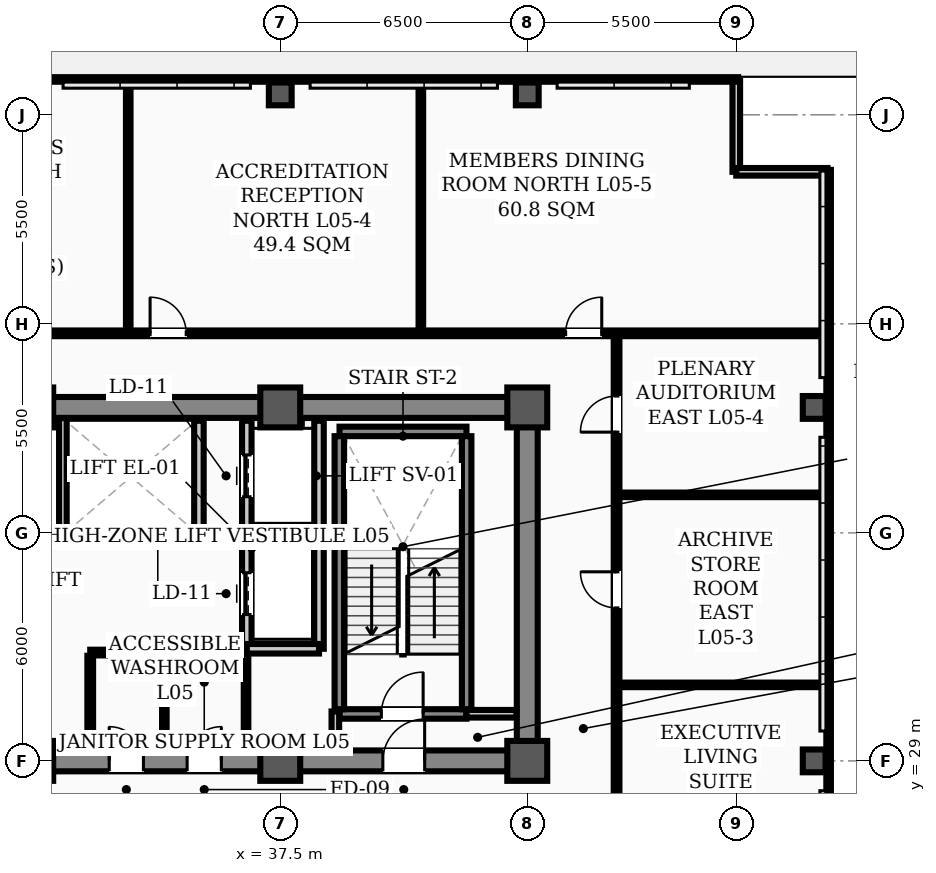
"""IFC4 building model, lengths in metres.
Left out: names, types, materials, properties, quantities, classifications, styles, units other than length and angle.
Written with IfcOpenShell. Run it as: python <this file> out.ifc"""

import sys

from ifc_helpers import new_model, si_unit, direction, frame, frame_2d, origin, origin_2d, place, context, subcontext, project, spatial, rectangle, hollow_rectangle, extrude, element, fill, save


model = new_model("IFC4")
c1 = context("Model", 3, precision=1e-05, world=origin(), true_north=direction((0.0, 1.0)))
c2 = subcontext(c1, "Body", "Model", "MODEL_VIEW")
j1 = project(units=[si_unit("LENGTHUNIT", "METRE"), si_unit("PLANEANGLEUNIT", "RADIAN")], contexts=[c1])
p1 = place(None, origin())
s1 = spatial("IfcSite", under=j1, at=p1, CompositionType="ELEMENT")
p2 = place(p1, origin())
s2 = spatial("IfcBuilding", under=s1, at=p2, CompositionType="ELEMENT")
p3 = place(p2, frame((0.0, 0.0, 22.0)))
s3 = spatial("IfcBuildingStorey", under=s2, at=p3, CompositionType="ELEMENT", Elevation=22.0)
for number, where, z_axis, x_axis in (
    (1, (31.0, 29.0, 0.0), (0.0, 0.0, 1.0), (1.0, 0.0, 0.0)),
    (2, (31.0, 38.3, 0.0), (0.0, 0.0, 1.0), (1.0, 0.0, 0.0)),
    (3, (37.5, 29.0, 0.0), (0.0, 0.0, 1.0), (1.0, 0.0, 0.0)),
    (4, (37.5, 38.3, 0.0), (0.0, 0.0, 1.0), (1.0, 0.0, 0.0)),
    (5, (44.0, 29.0, 0.0), (0.0, 0.0, 1.0), (1.0, 0.0, 0.0)),
    (6, (44.0, 38.3, 0.0), (0.0, 0.0, 1.0), (1.0, 0.0, 0.0)),
):
    element("IfcColumn", number, at=place(p3, frame(where, z_axis=z_axis, x_axis=x_axis)), inside=s3, PredefinedType="COLUMN", context=c2, shape_type="SweptSolid", body=[
        extrude(hollow_rectangle(XDim=1.05, YDim=1.05, WallThickness=0.038, InnerFilletRadius=0.019, OuterFilletRadius=0.057, at=origin_2d()), origin(), (0.0, 0.0, 1.0), 4.5),
    ])
for number, where, z_axis, x_axis in (
    (7, (37.5, 46.55, 0.0), (0.0, 0.0, 1.0), (1.0, 0.0, 0.0)),
    (8, (44.0, 46.55, 0.0), (0.0, 0.0, 1.0), (1.0, 0.0, 0.0)),
    (9, (51.55, 29.0, 0.0), (0.0, 0.0, 1.0), (1.0, 0.0, 0.0)),
    (10, (51.55, 38.3, 0.0), (0.0, 0.0, 1.0), (1.0, 0.0, 0.0)),
):
    element("IfcColumn", number, at=place(p3, frame(where, z_axis=z_axis, x_axis=x_axis)), inside=s3, PredefinedType="COLUMN", context=c2, shape_type="SweptSolid", body=[
        extrude(hollow_rectangle(XDim=0.6, YDim=0.6, WallThickness=0.026, InnerFilletRadius=0.013, OuterFilletRadius=0.039, at=origin_2d()), origin(), (0.0, 0.0, 1.0), 4.5),
    ])
for number, where, z_axis, x_axis in (
    (11, (49.5, 46.9, 0.0), (0.0, 0.0, 1.0), (0.0, -1.0, 0.0)),
    (12, (49.5, 44.5, 0.0), (0.0, 0.0, 1.0), (1.0, 0.0, 0.0)),
):
    element("IfcWall", number, at=place(p3, frame(where, z_axis=z_axis, x_axis=x_axis)), inside=s3, PredefinedType="PARAPET", context=c2, shape_type="SweptSolid", body=[
        extrude(rectangle(XDim=2.4, YDim=0.2, at=frame_2d((1.2, 0.0))), origin(), (0.0, 0.0, 1.0), 1.2),
    ])
p4 = place(p3, frame((4.45, 46.93, 0.0), z_axis=(0.0, 0.0, 1.0), x_axis=(1.0, 0.0, 0.0)))
e13 = element("IfcWall", 13, at=p4, inside=s3, PredefinedType="PARAPET", context=c2, shape_type="SweptSolid", body=[
    extrude(rectangle(XDim=45.1, YDim=0.12, at=frame_2d((22.55, 0.0))), origin(), (0.0, 0.0, 1.0), 1.2),
])
p5 = place(p3, frame((51.93, 17.45, 0.0), z_axis=(0.0, 0.0, 1.0), x_axis=(0.0, 1.0, 0.0)))
e14 = element("IfcWall", 14, at=p5, inside=s3, PredefinedType="PARAPET", context=c2, shape_type="SweptSolid", body=[
    extrude(rectangle(XDim=27.1, YDim=0.12, at=frame_2d((13.55, 0.0))), origin(), (0.0, 0.0, 1.0), 1.2),
])
p6 = place(p3, frame((13.5, 29.0, 0.0), z_axis=(0.0, 0.0, 1.0), x_axis=(1.0, 0.0, 0.0)))
e15 = element("IfcWall", 15, at=p6, inside=s3, PredefinedType="SHEAR", context=c2, shape_type="SweptSolid", body=[
    extrude(rectangle(XDim=30.5, YDim=0.55, at=frame_2d((15.25, 0.0))), origin(), (0.0, 0.0, 1.0), 4.32),
])
p7 = place(p6, frame((1.75, 0.0, 0.0)))
e16 = element("IfcOpeningElement", 16, at=p7, cuts=e15, PredefinedType="OPENING", context=c2, shape_type="SweptSolid", body=[
    extrude(rectangle(XDim=1.1, YDim=2.08, at=frame_2d((0.55, 1.04))), frame((0.0, 0.285, 0.0), z_axis=(0.0, -1.0, 0.0), x_axis=(1.0, 0.0, 0.0)), (0.0, 0.0, 1.0), 0.57),
])
p8 = place(p6, frame((26.7, 0.0, 0.0)))
e17 = element("IfcOpeningElement", 17, at=p8, cuts=e15, PredefinedType="OPENING", context=c2, shape_type="SweptSolid", body=[
    extrude(rectangle(XDim=1.1, YDim=2.08, at=frame_2d((0.55, 1.04))), frame((0.0, 0.285, 0.0), z_axis=(0.0, -1.0, 0.0), x_axis=(1.0, 0.0, 0.0)), (0.0, 0.0, 1.0), 0.57),
])
p9 = place(p6, frame((6.8, 0.0, 0.0)))
e18 = element("IfcOpeningElement", 18, at=p9, cuts=e15, PredefinedType="OPENING", context=c2, shape_type="SweptSolid", body=[
    extrude(rectangle(XDim=1.1, YDim=2.08, at=frame_2d((0.55, 1.04))), frame((0.0, 0.285, 0.0), z_axis=(0.0, -1.0, 0.0), x_axis=(1.0, 0.0, 0.0)), (0.0, 0.0, 1.0), 0.57),
])
p10 = place(p6, frame((13.2, 0.0, 0.0)))
e19 = element("IfcOpeningElement", 19, at=p10, cuts=e15, PredefinedType="OPENING", context=c2, shape_type="SweptSolid", body=[
    extrude(rectangle(XDim=1.6, YDim=2.08, at=frame_2d((0.8, 1.04))), frame((0.0, 0.285, 0.0), z_axis=(0.0, -1.0, 0.0), x_axis=(1.0, 0.0, 0.0)), (0.0, 0.0, 1.0), 0.57),
])
p11 = place(p6, frame((19.5, 0.0, 0.0)))
e20 = element("IfcOpeningElement", 20, at=p11, cuts=e15, PredefinedType="OPENING", context=c2, shape_type="SweptSolid", body=[
    extrude(rectangle(XDim=0.9, YDim=2.08, at=frame_2d((0.45, 1.04))), frame((0.0, 0.285, 0.0), z_axis=(0.0, -1.0, 0.0), x_axis=(1.0, 0.0, 0.0)), (0.0, 0.0, 1.0), 0.57),
])
p12 = place(p6, frame((21.55, 0.0, 0.0)))
e21 = element("IfcOpeningElement", 21, at=p12, cuts=e15, PredefinedType="OPENING", context=c2, shape_type="SweptSolid", body=[
    extrude(rectangle(XDim=0.9, YDim=2.08, at=frame_2d((0.45, 1.04))), frame((0.0, 0.285, 0.0), z_axis=(0.0, -1.0, 0.0), x_axis=(1.0, 0.0, 0.0)), (0.0, 0.0, 1.0), 0.57),
])
p13 = place(p3, frame((13.5, 38.3, 0.0), z_axis=(0.0, 0.0, 1.0), x_axis=(1.0, 0.0, 0.0)))
e22 = element("IfcWall", 22, at=p13, inside=s3, PredefinedType="SHEAR", context=c2, shape_type="SweptSolid", body=[
    extrude(rectangle(XDim=30.5, YDim=0.55, at=frame_2d((15.25, 0.0))), origin(), (0.0, 0.0, 1.0), 4.32),
])
p14 = place(p3, frame((44.0, 29.35, 0.0), z_axis=(0.0, 0.0, 1.0), x_axis=(0.0, 1.0, 0.0)))
e23 = element("IfcWall", 23, at=p14, inside=s3, PredefinedType="SHEAR", context=c2, shape_type="SweptSolid", body=[
    extrude(rectangle(XDim=8.6, YDim=0.55, at=frame_2d((4.3, 0.0))), origin(), (0.0, 0.0, 1.0), 4.32),
])
p15 = place(p3, frame((39.06, 30.235, 0.0), z_axis=(0.0, 0.0, 1.0), x_axis=(1.0, 0.0, 0.0)))
e24 = element("IfcWall", 24, at=p15, inside=s3, PredefinedType="STANDARD", context=c2, shape_type="SweptSolid", body=[
    extrude(rectangle(XDim=3.34, YDim=0.25, at=frame_2d((1.67, 0.0))), origin(), (0.0, 0.0, 1.0), 4.32),
])
p16 = place(p15, frame((1.1, 0.0, 0.0)))
e25 = element("IfcOpeningElement", 25, at=p16, cuts=e24, PredefinedType="OPENING", context=c2, shape_type="SweptSolid", body=[
    extrude(rectangle(XDim=1.1, YDim=2.08, at=frame_2d((0.55, 1.04))), frame((0.0, 0.135, 0.0), z_axis=(0.0, -1.0, 0.0), x_axis=(1.0, 0.0, 0.0)), (0.0, 0.0, 1.0), 0.27),
])
p17 = place(p3, frame((39.06, 37.669, 0.0), z_axis=(0.0, 0.0, 1.0), x_axis=(1.0, 0.0, 0.0)))
e26 = element("IfcWall", 26, at=p17, inside=s3, PredefinedType="STANDARD", context=c2, shape_type="SweptSolid", body=[
    extrude(rectangle(XDim=3.34, YDim=0.25, at=frame_2d((1.67, 0.0))), origin(), (0.0, 0.0, 1.0), 4.32),
])
for number, where, z_axis, x_axis in (
    (27, (39.055, 30.36, 0.0), (0.0, 0.0, 1.0), (0.0, 1.0, 0.0)),
    (28, (42.405, 30.36, 0.0), (0.0, 0.0, 1.0), (0.0, 1.0, 0.0)),
):
    element("IfcWall", number, at=place(p3, frame(where, z_axis=z_axis, x_axis=x_axis)), inside=s3, PredefinedType="STANDARD", context=c2, shape_type="SweptSolid", body=[
        extrude(rectangle(XDim=7.184, YDim=0.25, at=frame_2d((3.592, 0.0))), origin(), (0.0, 0.0, 1.0), 4.32),
    ])
p18 = place(p3, frame((36.62, 31.95, 0.0), z_axis=(0.0, 0.0, 1.0), x_axis=(0.0, 1.0, 0.0)))
e29 = element("IfcWall", 29, at=p18, inside=s3, PredefinedType="STANDARD", context=c2, shape_type="SweptSolid", body=[
    extrude(rectangle(XDim=6.0, YDim=0.25, at=frame_2d((3.0, 0.0))), origin(), (0.0, 0.0, 1.0), 3.9),
])
p19 = place(p18, frame((0.9, 0.0, 0.0)))
e30 = element("IfcOpeningElement", 30, at=p19, cuts=e29, PredefinedType="OPENING", context=c2, shape_type="SweptSolid", body=[
    extrude(rectangle(XDim=1.1, YDim=2.08, at=frame_2d((0.55, 1.04))), frame((0.0, 0.135, 0.0), z_axis=(0.0, -1.0, 0.0), x_axis=(1.0, 0.0, 0.0)), (0.0, 0.0, 1.0), 0.27),
])
p20 = place(p18, frame((4.0, 0.0, 0.0)))
e31 = element("IfcOpeningElement", 31, at=p20, cuts=e29, PredefinedType="OPENING", context=c2, shape_type="SweptSolid", body=[
    extrude(rectangle(XDim=1.1, YDim=2.08, at=frame_2d((0.55, 1.04))), frame((0.0, 0.135, 0.0), z_axis=(0.0, -1.0, 0.0), x_axis=(1.0, 0.0, 0.0)), (0.0, 0.0, 1.0), 0.27),
])
p21 = place(p3, frame((38.52, 31.95, 0.0), z_axis=(0.0, 0.0, 1.0), x_axis=(0.0, 1.0, 0.0)))
e32 = element("IfcWall", 32, at=p21, inside=s3, PredefinedType="STANDARD", context=c2, shape_type="SweptSolid", body=[
    extrude(rectangle(XDim=6.0, YDim=0.25, at=frame_2d((3.0, 0.0))), origin(), (0.0, 0.0, 1.0), 3.9),
])
p22 = place(p3, frame((36.62, 31.95, 0.0), z_axis=(0.0, 0.0, 1.0), x_axis=(1.0, 0.0, 0.0)))
e33 = element("IfcWall", 33, at=p22, inside=s3, PredefinedType="STANDARD", context=c2, shape_type="SweptSolid", body=[
    extrude(rectangle(XDim=1.9, YDim=0.25, at=frame_2d((0.95, 0.0))), origin(), (0.0, 0.0, 1.0), 4.08),
])
p23 = place(p3, frame((35.36, 34.9, 0.0), z_axis=(0.0, 0.0, 1.0), x_axis=(0.0, 1.0, 0.0)))
e34 = element("IfcWall", 34, at=p23, inside=s3, PredefinedType="STANDARD", context=c2, shape_type="SweptSolid", body=[
    extrude(rectangle(XDim=3.05, YDim=0.25, at=frame_2d((1.525, 0.0))), origin(), (0.0, 0.0, 1.0), 3.9),
])
p24 = place(p3, frame((28.2, 34.9, 0.0), z_axis=(0.0, 0.0, 1.0), x_axis=(1.0, 0.0, 0.0)))
e35 = element("IfcWall", 35, at=p24, inside=s3, PredefinedType="STANDARD", context=c2, shape_type="SweptSolid", body=[
    extrude(rectangle(XDim=3.55, YDim=0.25, at=frame_2d((1.775, 0.0))), origin(), (0.0, 0.0, 1.0), 4.32),
])
p25 = place(p3, frame((31.8, 34.9, 0.0), z_axis=(0.0, 0.0, 1.0), x_axis=(1.0, 0.0, 0.0)))
e36 = element("IfcWall", 36, at=p25, inside=s3, PredefinedType="STANDARD", context=c2, shape_type="SweptSolid", body=[
    extrude(rectangle(XDim=3.6, YDim=0.25, at=frame_2d((1.8, 0.0))), origin(), (0.0, 0.0, 1.0), 4.32),
])
p26 = place(p3, frame((42.4, 30.24, 0.0), z_axis=(0.0, 0.0, 1.0), x_axis=(1.0, 0.0, 0.0)))
e37 = element("IfcWall", 37, at=p26, inside=s3, PredefinedType="STANDARD", context=c2, shape_type="SweptSolid", body=[
    extrude(rectangle(XDim=1.315, YDim=0.2, at=frame_2d((0.658, 0.0))), origin(), (0.0, 0.0, 1.0), 3.7),
])
p27 = place(p3, frame((32.5, 31.85, 0.0), z_axis=(0.0, 0.0, 1.0), x_axis=(1.0, 0.0, 0.0)))
e38 = element("IfcWall", 38, at=p27, inside=s3, PredefinedType="PARTITIONING", context=c2, shape_type="SweptSolid", body=[
    extrude(rectangle(XDim=4.1, YDim=0.15, at=frame_2d((2.05, 0.0))), origin(), (0.0, 0.0, 1.0), 4.32),
])
for number, where, z_axis, x_axis in (
    (39, (46.35, 31.0, 0.0), (0.0, 0.0, 1.0), (1.0, 0.0, 0.0)),
    (40, (46.35, 36.0, 0.0), (0.0, 0.0, 1.0), (1.0, 0.0, 0.0)),
):
    element("IfcWall", number, at=place(p3, frame(where, z_axis=z_axis, x_axis=x_axis)), inside=s3, PredefinedType="PARTITIONING", context=c2, shape_type="SweptSolid", body=[
        extrude(rectangle(XDim=5.34, YDim=0.12, at=frame_2d((2.67, 0.0))), origin(), (0.0, 0.0, 1.0), 3.812),
    ])
p28 = place(p3, frame((2.31, 40.25, 0.0), z_axis=(0.0, 0.0, 1.0), x_axis=(1.0, 0.0, 0.0)))
e41 = element("IfcWall", 41, at=p28, inside=s3, PredefinedType="PARTITIONING", context=c2, shape_type="SweptSolid", body=[
    extrude(rectangle(XDim=49.38, YDim=0.15, at=frame_2d((24.69, 0.0))), origin(), (0.0, 0.0, 1.0), 3.7),
])
p29 = place(p28, frame((9.23, 0.0, 0.0)))
e42 = element("IfcOpeningElement", 42, at=p29, cuts=e41, PredefinedType="OPENING", context=c2, shape_type="SweptSolid", body=[
    extrude(rectangle(XDim=0.95, YDim=2.08, at=frame_2d((0.475, 1.04))), frame((0.0, 0.085, 0.0), z_axis=(0.0, -1.0, 0.0), x_axis=(1.0, 0.0, 0.0)), (0.0, 0.0, 1.0), 0.17),
])
p30 = place(p28, frame((18.715, 0.0, 0.0)))
e43 = element("IfcOpeningElement", 43, at=p30, cuts=e41, PredefinedType="OPENING", context=c2, shape_type="SweptSolid", body=[
    extrude(rectangle(XDim=0.95, YDim=2.08, at=frame_2d((0.475, 1.04))), frame((0.0, 0.085, 0.0), z_axis=(0.0, -1.0, 0.0), x_axis=(1.0, 0.0, 0.0)), (0.0, 0.0, 1.0), 0.17),
])
p31 = place(p28, frame((26.715, 0.0, 0.0)))
e44 = element("IfcOpeningElement", 44, at=p31, cuts=e41, PredefinedType="OPENING", context=c2, shape_type="SweptSolid", body=[
    extrude(rectangle(XDim=0.95, YDim=2.08, at=frame_2d((0.475, 1.04))), frame((0.0, 0.085, 0.0), z_axis=(0.0, -1.0, 0.0), x_axis=(1.0, 0.0, 0.0)), (0.0, 0.0, 1.0), 0.17),
])
p32 = place(p28, frame((31.765, 0.0, 0.0)))
e45 = element("IfcOpeningElement", 45, at=p32, cuts=e41, PredefinedType="OPENING", context=c2, shape_type="SweptSolid", body=[
    extrude(rectangle(XDim=0.95, YDim=2.08, at=frame_2d((0.475, 1.04))), frame((0.0, 0.085, 0.0), z_axis=(0.0, -1.0, 0.0), x_axis=(1.0, 0.0, 0.0)), (0.0, 0.0, 1.0), 0.17),
])
p33 = place(p28, frame((42.7, 0.0, 0.0)))
e46 = element("IfcOpeningElement", 46, at=p33, cuts=e41, PredefinedType="OPENING", context=c2, shape_type="SweptSolid", body=[
    extrude(rectangle(XDim=0.95, YDim=2.08, at=frame_2d((0.475, 1.04))), frame((0.0, 0.085, 0.0), z_axis=(0.0, -1.0, 0.0), x_axis=(1.0, 0.0, 0.0)), (0.0, 0.0, 1.0), 0.17),
])
p34 = place(p3, frame((38.95, 29.285, 0.0), z_axis=(0.0, 0.0, 1.0), x_axis=(0.0, 1.0, 0.0)))
e47 = element("IfcWall", 47, at=p34, inside=s3, PredefinedType="STANDARD", context=c2, shape_type="SweptSolid", body=[
    extrude(rectangle(XDim=1.015, YDim=0.2, at=frame_2d((0.508, 0.0))), origin(), (0.0, 0.0, 1.0), 3.9),
])
p35 = place(p3, frame((32.5, 29.285, 0.0), z_axis=(0.0, 0.0, 1.0), x_axis=(0.0, 1.0, 0.0)))
e48 = element("IfcWall", 48, at=p35, inside=s3, PredefinedType="PARTITIONING", context=c2, shape_type="SweptSolid", body=[
    extrude(rectangle(XDim=2.48, YDim=0.15, at=frame_2d((1.24, 0.0))), origin(), (0.0, 0.0, 1.0), 3.9),
])
for number, where, z_axis, x_axis in (
    (49, (36.6, 29.285, 0.0), (0.0, 0.0, 1.0), (0.0, 1.0, 0.0)),
    (50, (34.45, 29.285, 0.0), (0.0, 0.0, 1.0), (0.0, 1.0, 0.0)),
):
    element("IfcWall", number, at=place(p3, frame(where, z_axis=z_axis, x_axis=x_axis)), inside=s3, PredefinedType="PARTITIONING", context=c2, shape_type="SweptSolid", body=[
        extrude(rectangle(XDim=2.48, YDim=0.12, at=frame_2d((1.24, 0.0))), origin(), (0.0, 0.0, 1.0), 3.9),
    ])
p36 = place(p3, frame((46.35, 17.635, 0.0), z_axis=(0.0, 0.0, 1.0), x_axis=(0.0, 1.0, 0.0)))
e51 = element("IfcWall", 51, at=p36, inside=s3, PredefinedType="PARTITIONING", context=c2, shape_type="SweptSolid", body=[
    extrude(rectangle(XDim=22.53, YDim=0.15, at=frame_2d((11.265, 0.0))), origin(), (0.0, 0.0, 1.0), 3.6),
])
p37 = place(p36, frame((3.165, 0.0, 0.0)))
e52 = element("IfcOpeningElement", 52, at=p37, cuts=e51, PredefinedType="OPENING", context=c2, shape_type="SweptSolid", body=[
    extrude(rectangle(XDim=0.95, YDim=2.08, at=frame_2d((0.475, 1.04))), frame((0.0, 0.085, 0.0), z_axis=(0.0, -1.0, 0.0), x_axis=(1.0, 0.0, 0.0)), (0.0, 0.0, 1.0), 0.17),
])
p38 = place(p36, frame((8.09, 0.0, 0.0)))
e53 = element("IfcOpeningElement", 53, at=p38, cuts=e51, PredefinedType="OPENING", context=c2, shape_type="SweptSolid", body=[
    extrude(rectangle(XDim=0.95, YDim=2.08, at=frame_2d((0.475, 1.04))), frame((0.0, 0.085, 0.0), z_axis=(0.0, -1.0, 0.0), x_axis=(1.0, 0.0, 0.0)), (0.0, 0.0, 1.0), 0.17),
])
p39 = place(p36, frame((15.39, 0.0, 0.0)))
e54 = element("IfcOpeningElement", 54, at=p39, cuts=e51, PredefinedType="OPENING", context=c2, shape_type="SweptSolid", body=[
    extrude(rectangle(XDim=0.95, YDim=2.08, at=frame_2d((0.475, 1.04))), frame((0.0, 0.085, 0.0), z_axis=(0.0, -1.0, 0.0), x_axis=(1.0, 0.0, 0.0)), (0.0, 0.0, 1.0), 0.17),
])
p40 = place(p36, frame((20.015, 0.0, 0.0)))
e55 = element("IfcOpeningElement", 55, at=p40, cuts=e51, PredefinedType="OPENING", context=c2, shape_type="SweptSolid", body=[
    extrude(rectangle(XDim=0.95, YDim=2.08, at=frame_2d((0.475, 1.04))), frame((0.0, 0.085, 0.0), z_axis=(0.0, -1.0, 0.0), x_axis=(1.0, 0.0, 0.0)), (0.0, 0.0, 1.0), 0.17),
])
for number, where, z_axis, x_axis in (
    (56, (33.5, 40.335, 0.0), (0.0, 0.0, 1.0), (0.0, 1.0, 0.0)),
    (57, (41.2, 40.335, 0.0), (0.0, 0.0, 1.0), (0.0, 1.0, 0.0)),
):
    element("IfcWall", number, at=place(p3, frame(where, z_axis=z_axis, x_axis=x_axis)), inside=s3, PredefinedType="PARTITIONING", context=c2, shape_type="SweptSolid", body=[
        extrude(rectangle(XDim=6.355, YDim=0.12, at=frame_2d((3.177, 0.0))), origin(), (0.0, 0.0, 1.0), 3.812),
    ])
p41 = place(p3, frame((31.78, 34.9, 0.0), z_axis=(0.0, 0.0, 1.0), x_axis=(0.0, 1.0, 0.0)))
e58 = element("IfcWall", 58, at=p41, inside=s3, PredefinedType="STANDARD", context=c2, shape_type="SweptSolid", body=[
    extrude(rectangle(XDim=3.12, YDim=0.2, at=frame_2d((1.56, 0.0))), origin(), (0.0, 0.0, 1.0), 3.9),
])
p42 = place(p16, origin())
e59 = element("IfcDoor", 59, at=p42, inside=s3, OperationType="SINGLE_SWING_RIGHT", PredefinedType="DOOR", context=c2, shape_type="SweptSolid", body=[
    extrude(rectangle(XDim=1.1, YDim=2.08, at=frame_2d((0.55, 1.04))), frame((0.0, 0.025, 0.0), z_axis=(0.0, -1.0, 0.0), x_axis=(1.0, 0.0, 0.0)), (0.0, 0.0, 1.0), 0.05),
])
fill(e25, e59)
p43 = place(p8, origin())
e60 = element("IfcDoor", 60, at=p43, inside=s3, OperationType="SINGLE_SWING_RIGHT", PredefinedType="DOOR", context=c2, shape_type="SweptSolid", body=[
    extrude(rectangle(XDim=1.1, YDim=2.08, at=frame_2d((0.55, 1.04))), frame((0.0, 0.025, 0.0), z_axis=(0.0, -1.0, 0.0), x_axis=(1.0, 0.0, 0.0)), (0.0, 0.0, 1.0), 0.05),
])
fill(e17, e60)
p44 = place(p11, origin())
e61 = element("IfcDoor", 61, at=p44, inside=s3, OperationType="SINGLE_SWING_LEFT", PredefinedType="DOOR", context=c2, shape_type="SweptSolid", body=[
    extrude(rectangle(XDim=0.9, YDim=2.08, at=frame_2d((0.45, 1.04))), frame((0.0, 0.025, 0.0), z_axis=(0.0, -1.0, 0.0), x_axis=(1.0, 0.0, 0.0)), (0.0, 0.0, 1.0), 0.05),
])
fill(e20, e61)
p45 = place(p12, origin())
e62 = element("IfcDoor", 62, at=p45, inside=s3, OperationType="SINGLE_SWING_RIGHT", PredefinedType="DOOR", context=c2, shape_type="SweptSolid", body=[
    extrude(rectangle(XDim=0.9, YDim=2.08, at=frame_2d((0.45, 1.04))), frame((0.0, 0.025, 0.0), z_axis=(0.0, -1.0, 0.0), x_axis=(1.0, 0.0, 0.0)), (0.0, 0.0, 1.0), 0.05),
])
fill(e21, e62)
p46 = place(p39, origin())
e63 = element("IfcDoor", 63, at=p46, inside=s3, OperationType="SINGLE_SWING_RIGHT", PredefinedType="DOOR", context=c2, shape_type="SweptSolid", body=[
    extrude(rectangle(XDim=0.95, YDim=2.08, at=frame_2d((0.475, 1.04))), frame((0.0, 0.025, 0.0), z_axis=(0.0, -1.0, 0.0), x_axis=(1.0, 0.0, 0.0)), (0.0, 0.0, 1.0), 0.05),
])
fill(e54, e63)
p47 = place(p40, origin())
e64 = element("IfcDoor", 64, at=p47, inside=s3, OperationType="SINGLE_SWING_LEFT", PredefinedType="DOOR", context=c2, shape_type="SweptSolid", body=[
    extrude(rectangle(XDim=0.95, YDim=2.08, at=frame_2d((0.475, 1.04))), frame((0.0, 0.025, 0.0), z_axis=(0.0, -1.0, 0.0), x_axis=(1.0, 0.0, 0.0)), (0.0, 0.0, 1.0), 0.05),
])
fill(e55, e64)
p48 = place(p32, origin())
e65 = element("IfcDoor", 65, at=p48, inside=s3, OperationType="SINGLE_SWING_LEFT", PredefinedType="DOOR", context=c2, shape_type="SweptSolid", body=[
    extrude(rectangle(XDim=0.95, YDim=2.08, at=frame_2d((0.475, 1.04))), frame((0.0, 0.025, 0.0), z_axis=(0.0, -1.0, 0.0), x_axis=(1.0, 0.0, 0.0)), (0.0, 0.0, 1.0), 0.05),
])
fill(e45, e65)
p49 = place(p33, origin())
e66 = element("IfcDoor", 66, at=p49, inside=s3, OperationType="SINGLE_SWING_RIGHT", PredefinedType="DOOR", context=c2, shape_type="SweptSolid", body=[
    extrude(rectangle(XDim=0.95, YDim=2.08, at=frame_2d((0.475, 1.04))), frame((0.0, 0.025, 0.0), z_axis=(0.0, -1.0, 0.0), x_axis=(1.0, 0.0, 0.0)), (0.0, 0.0, 1.0), 0.05),
])
fill(e46, e66)
p50 = place(p19, origin())
e67 = element("IfcDoor", 67, at=p50, inside=s3, OperationType="SLIDING_TO_LEFT", PredefinedType="DOOR", context=c2, shape_type="SweptSolid", body=[
    extrude(rectangle(XDim=1.1, YDim=2.08, at=frame_2d((0.55, 1.04))), frame((0.0, 0.025, 0.0), z_axis=(0.0, -1.0, 0.0), x_axis=(1.0, 0.0, 0.0)), (0.0, 0.0, 1.0), 0.05),
])
fill(e30, e67)
p51 = place(p20, origin())
e68 = element("IfcDoor", 68, at=p51, inside=s3, OperationType="SLIDING_TO_LEFT", PredefinedType="DOOR", context=c2, shape_type="SweptSolid", body=[
    extrude(rectangle(XDim=1.1, YDim=2.08, at=frame_2d((0.55, 1.04))), frame((0.0, 0.025, 0.0), z_axis=(0.0, -1.0, 0.0), x_axis=(1.0, 0.0, 0.0)), (0.0, 0.0, 1.0), 0.05),
])
fill(e31, e68)
save(model, sys.argv[1])
